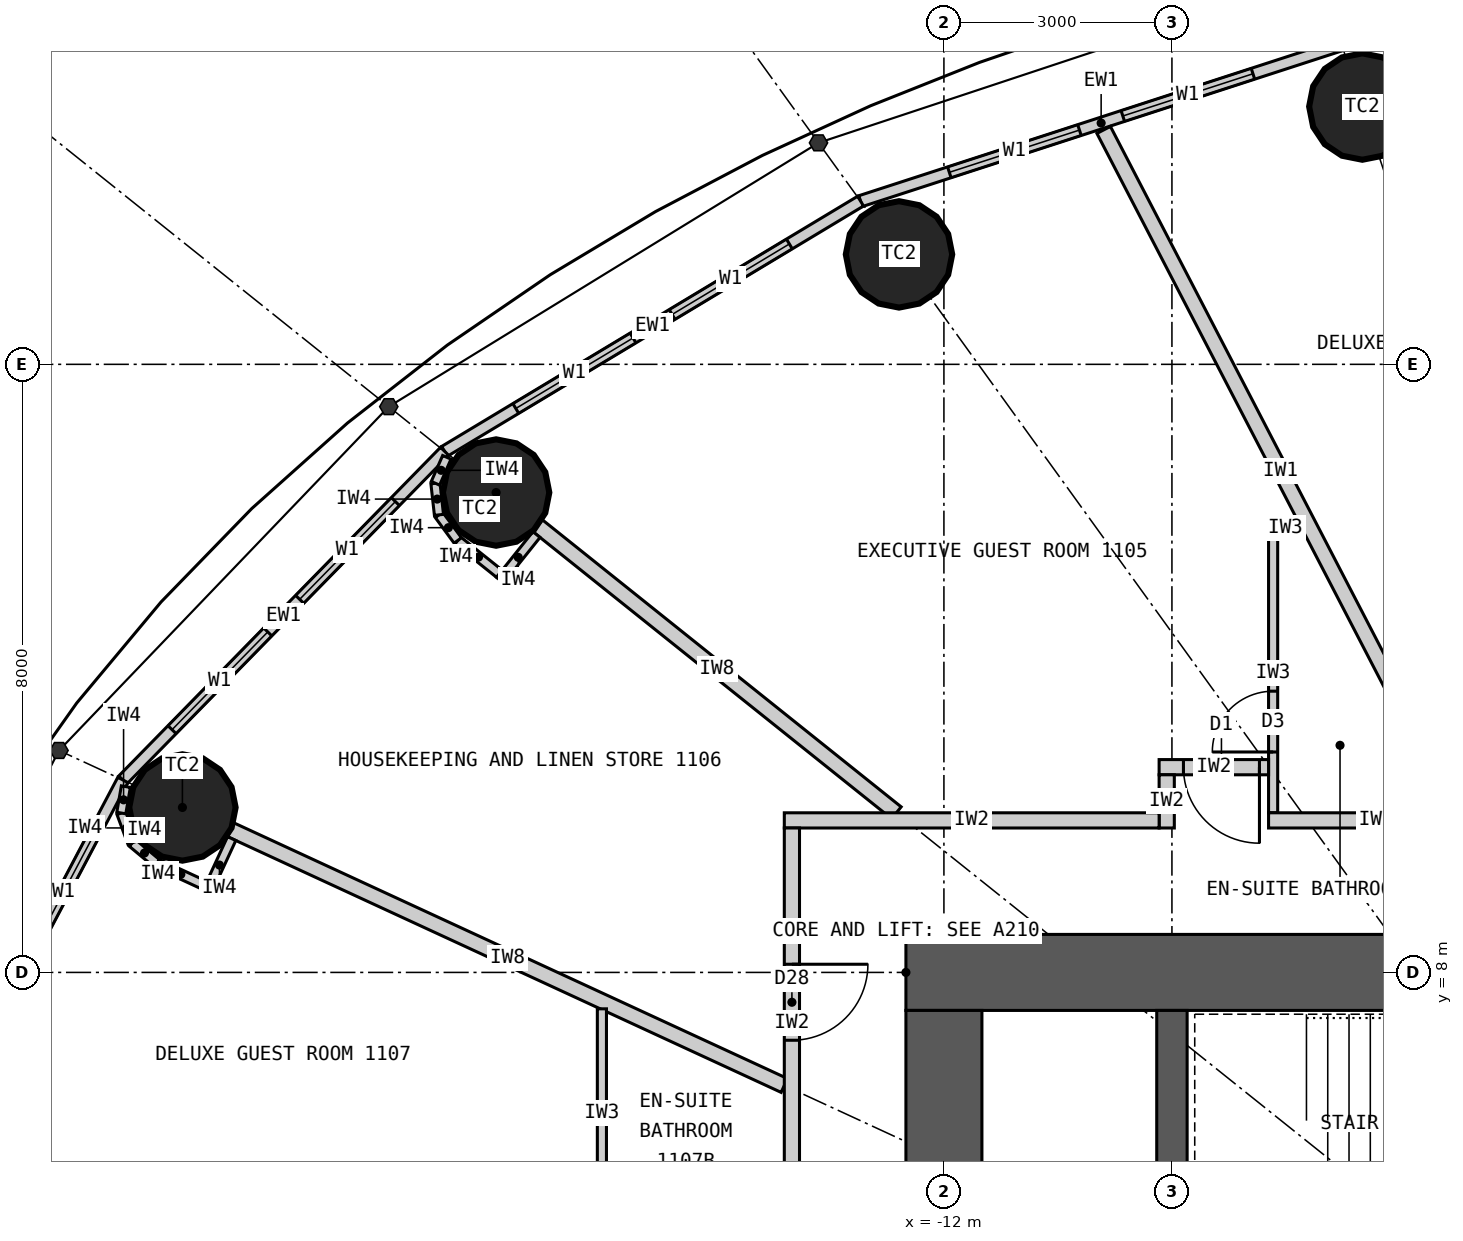
"""IFC4 building model, lengths in metres.
Left out: names, types, materials, properties, quantities, classifications, styles, units other than length and angle.
Written with IfcOpenShell. Run it as: python <this file> out.ifc"""

import sys

from ifc_helpers import new_model, si_unit, direction, frame, frame_2d, origin, origin_2d, place, context, subcontext, project, spatial, rectangle, circle, extrude, element, fill, save


model = new_model("IFC4")
c1 = context("Model", 3, precision=1e-05, world=origin(), true_north=direction((0.0, 1.0)))
c2 = subcontext(c1, "Body", "Model", "MODEL_VIEW")
j1 = project(units=[si_unit("LENGTHUNIT", "METRE"), si_unit("PLANEANGLEUNIT", "RADIAN")], contexts=[c1])
p1 = place(None, origin())
s1 = spatial("IfcSite", under=j1, at=p1, CompositionType="ELEMENT")
p2 = place(p1, origin())
s2 = spatial("IfcBuilding", under=s1, at=p2, CompositionType="ELEMENT")
p3 = place(p2, frame((0.0, 0.0, 50.7)))
s3 = spatial("IfcBuildingStorey", under=s2, at=p3, CompositionType="ELEMENT", Elevation=50.7)
for number, where, z_axis, x_axis in (
    (1, (-6.495, 19.391, 0.0), (0.0, 0.0, 1.0), (1.0, 0.0, 0.0)),
    (2, (-12.591, 17.447, 0.0), (0.0, 0.0, 1.0), (1.0, 0.0, 0.0)),
    (3, (-17.892, 14.313, 0.0), (0.0, 0.0, 1.0), (1.0, 0.0, 0.0)),
    (4, (-22.019, 10.17, 0.0), (0.0, 0.0, 1.0), (1.0, 0.0, 0.0)),
):
    element("IfcColumn", number, at=place(p3, frame(where, z_axis=z_axis, x_axis=x_axis)), inside=s3, PredefinedType="COLUMN", context=c2, shape_type="SweptSolid", body=[
        extrude(circle(Radius=0.7, at=origin_2d()), origin(), (0.0, 0.0, 1.0), 3.3),
    ])
p4 = place(p3, frame((-12.5, 8.0, 0.0), z_axis=(0.0, 0.0, 1.0), x_axis=(1.0, 0.0, 0.0)))
e5 = element("IfcWall", 5, at=p4, inside=s3, PredefinedType="SHEAR", context=c2, shape_type="SweptSolid", body=[
    extrude(rectangle(XDim=25.0, YDim=1.0, at=frame_2d((12.5, 0.0))), origin(), (0.0, 0.0, 1.0), 3.3),
])
p5 = place(p4, frame((11.2, 0.0, 0.0)))
e6 = element("IfcOpeningElement", 6, at=p5, cuts=e5, PredefinedType="OPENING", context=c2, shape_type="SweptSolid", body=[
    extrude(rectangle(XDim=1.2, YDim=2.2, at=frame_2d((0.6, 1.1))), frame((0.0, 0.51, 0.0), z_axis=(0.0, -1.0, 0.0), x_axis=(1.0, 0.0, 0.0)), (0.0, 0.0, 1.0), 1.02),
])
p6 = place(p4, frame((18.8, 0.0, 0.0)))
e7 = element("IfcOpeningElement", 7, at=p6, cuts=e5, PredefinedType="OPENING", context=c2, shape_type="SweptSolid", body=[
    extrude(rectangle(XDim=0.9, YDim=2.2, at=frame_2d((0.45, 1.1))), frame((0.0, 0.51, 0.0), z_axis=(0.0, -1.0, 0.0), x_axis=(1.0, 0.0, 0.0)), (0.0, 0.0, 1.0), 1.02),
])
p7 = place(p3, frame((-12.0, 7.5, 0.0), z_axis=(0.0, 0.0, 1.0), x_axis=(0.0, -1.0, 0.0)))
e8 = element("IfcWall", 8, at=p7, inside=s3, PredefinedType="SHEAR", context=c2, shape_type="SweptSolid", body=[
    extrude(rectangle(XDim=15.0, YDim=1.0, at=frame_2d((7.5, 0.0))), origin(), (0.0, 0.0, 1.0), 3.3),
])
p8 = place(p7, frame((6.6, 0.0, 0.0)))
e9 = element("IfcOpeningElement", 9, at=p8, cuts=e8, PredefinedType="OPENING", context=c2, shape_type="SweptSolid", body=[
    extrude(rectangle(XDim=1.8, YDim=2.2, at=frame_2d((0.9, 1.1))), frame((0.0, 0.51, 0.0), z_axis=(0.0, -1.0, 0.0), x_axis=(1.0, 0.0, 0.0)), (0.0, 0.0, 1.0), 1.02),
])
p9 = place(p3, frame((-9.0, 4.5, 0.0), z_axis=(0.0, 0.0, 1.0), x_axis=(0.0, 1.0, 0.0)))
e10 = element("IfcWall", 10, at=p9, inside=s3, PredefinedType="SHEAR", context=c2, shape_type="SweptSolid", body=[
    extrude(rectangle(XDim=3.0, YDim=0.4, at=frame_2d((1.5, 0.0))), origin(), (0.0, 0.0, 1.0), 3.3),
])
p10 = place(p3, frame((-6.766, 20.202, 0.0), z_axis=(0.0, 0.0, 1.0), x_axis=(-0.951137534625, -0.308767534285, 0.0)))
e11 = element("IfcWall", 11, at=p10, inside=s3, PredefinedType="ELEMENTEDWALL", context=c2, shape_type="SweptSolid", body=[
    extrude(rectangle(XDim=6.655, YDim=0.15, at=frame_2d((3.328, 0.0))), origin(), (0.0, 0.0, 1.0), 3.12),
])
p11 = place(p10, frame((1.228, 0.0, 0.9)))
e12 = element("IfcOpeningElement", 12, at=p11, cuts=e11, PredefinedType="OPENING", context=c2, shape_type="SweptSolid", body=[
    extrude(rectangle(XDim=1.8, YDim=1.9, at=frame_2d((0.9, 0.95))), frame((0.0, 0.085, 0.0), z_axis=(0.0, -1.0, 0.0), x_axis=(1.0, 0.0, 0.0)), (0.0, 0.0, 1.0), 0.17),
])
p12 = place(p10, frame((3.628, 0.0, 0.9)))
e13 = element("IfcOpeningElement", 13, at=p12, cuts=e11, PredefinedType="OPENING", context=c2, shape_type="SweptSolid", body=[
    extrude(rectangle(XDim=1.8, YDim=1.9, at=frame_2d((0.9, 0.95))), frame((0.0, 0.085, 0.0), z_axis=(0.0, -1.0, 0.0), x_axis=(1.0, 0.0, 0.0)), (0.0, 0.0, 1.0), 0.17),
])
p13 = place(p3, frame((-13.096, 18.147, 0.0), z_axis=(0.0, 0.0, 1.0), x_axis=(-0.856983180864, -0.515344377787, 0.0)))
e14 = element("IfcWall", 14, at=p13, inside=s3, PredefinedType="ELEMENTEDWALL", context=c2, shape_type="SweptSolid", body=[
    extrude(rectangle(XDim=6.386, YDim=0.15, at=frame_2d((3.193, 0.0))), origin(), (0.0, 0.0, 1.0), 3.12),
])
p14 = place(p13, frame((1.093, 0.0, 0.9)))
e15 = element("IfcOpeningElement", 15, at=p14, cuts=e14, PredefinedType="OPENING", context=c2, shape_type="SweptSolid", body=[
    extrude(rectangle(XDim=1.8, YDim=1.9, at=frame_2d((0.9, 0.95))), frame((0.0, 0.085, 0.0), z_axis=(0.0, -1.0, 0.0), x_axis=(1.0, 0.0, 0.0)), (0.0, 0.0, 1.0), 0.17),
])
p15 = place(p13, frame((3.493, 0.0, 0.9)))
e16 = element("IfcOpeningElement", 16, at=p15, cuts=e14, PredefinedType="OPENING", context=c2, shape_type="SweptSolid", body=[
    extrude(rectangle(XDim=1.8, YDim=1.9, at=frame_2d((0.9, 0.95))), frame((0.0, 0.085, 0.0), z_axis=(0.0, -1.0, 0.0), x_axis=(1.0, 0.0, 0.0)), (0.0, 0.0, 1.0), 0.17),
])
p16 = place(p3, frame((-18.57, 14.856, 0.0), z_axis=(0.0, 0.0, 1.0), x_axis=(-0.699602905915, -0.714531856557, 0.0)))
e17 = element("IfcWall", 17, at=p16, inside=s3, PredefinedType="ELEMENTEDWALL", context=c2, shape_type="SweptSolid", body=[
    extrude(rectangle(XDim=6.051, YDim=0.15, at=frame_2d((3.025, 0.0))), origin(), (0.0, 0.0, 1.0), 3.12),
])
p17 = place(p16, frame((0.926, 0.0, 0.9)))
e18 = element("IfcOpeningElement", 18, at=p17, cuts=e17, PredefinedType="OPENING", context=c2, shape_type="SweptSolid", body=[
    extrude(rectangle(XDim=1.8, YDim=1.9, at=frame_2d((0.9, 0.95))), frame((0.0, 0.085, 0.0), z_axis=(0.0, -1.0, 0.0), x_axis=(1.0, 0.0, 0.0)), (0.0, 0.0, 1.0), 0.17),
])
p18 = place(p16, frame((3.325, 0.0, 0.9)))
e19 = element("IfcOpeningElement", 19, at=p18, cuts=e17, PredefinedType="OPENING", context=c2, shape_type="SweptSolid", body=[
    extrude(rectangle(XDim=1.8, YDim=1.9, at=frame_2d((0.9, 0.95))), frame((0.0, 0.085, 0.0), z_axis=(0.0, -1.0, 0.0), x_axis=(1.0, 0.0, 0.0)), (0.0, 0.0, 1.0), 0.17),
])
p19 = place(p3, frame((-22.803, 10.532, 0.0), z_axis=(0.0, 0.0, 1.0), x_axis=(-0.467296867008, -0.884100468321, 0.0)))
e20 = element("IfcWall", 20, at=p19, inside=s3, PredefinedType="ELEMENTEDWALL", context=c2, shape_type="SweptSolid", body=[
    extrude(rectangle(XDim=5.734, YDim=0.15, at=frame_2d((2.867, 0.0))), origin(), (0.0, 0.0, 1.0), 3.12),
])
p20 = place(p19, frame((0.767, 0.0, 0.9)))
e21 = element("IfcOpeningElement", 21, at=p20, cuts=e20, PredefinedType="OPENING", context=c2, shape_type="SweptSolid", body=[
    extrude(rectangle(XDim=1.8, YDim=1.9, at=frame_2d((0.9, 0.95))), frame((0.0, 0.085, 0.0), z_axis=(0.0, -1.0, 0.0), x_axis=(1.0, 0.0, 0.0)), (0.0, 0.0, 1.0), 0.17),
])
p21 = place(p19, frame((3.167, 0.0, 0.9)))
e22 = element("IfcOpeningElement", 22, at=p21, cuts=e20, PredefinedType="OPENING", context=c2, shape_type="SweptSolid", body=[
    extrude(rectangle(XDim=1.8, YDim=1.9, at=frame_2d((0.9, 0.95))), frame((0.0, 0.085, 0.0), z_axis=(0.0, -1.0, 0.0), x_axis=(1.0, 0.0, 0.0)), (0.0, 0.0, 1.0), 0.17),
])
p22 = place(p3, frame((-5.239, 10.1, 0.0), z_axis=(0.0, 0.0, 1.0), x_axis=(-0.460422783389, 0.887699758103, 0.0)))
e23 = element("IfcWall", 23, at=p22, inside=s3, PredefinedType="PARTITIONING", context=c2, shape_type="SweptSolid", body=[
    extrude(rectangle(XDim=10.12, YDim=0.2, at=frame_2d((5.06, 0.0))), origin(), (0.0, 0.0, 1.0), 3.12),
])
p23 = place(p3, frame((-12.625, 10.1, 0.0), z_axis=(0.0, 0.0, 1.0), x_axis=(-0.780892451574, 0.624665493744, 0.0)))
e24 = element("IfcWall", 24, at=p23, inside=s3, PredefinedType="PARTITIONING", context=c2, shape_type="SweptSolid", body=[
    extrude(rectangle(XDim=6.045, YDim=0.2, at=frame_2d((3.022, 0.0))), origin(), (0.0, 0.0, 1.0), 2.32),
])
p24 = place(p3, frame((-14.1, 6.512, 0.0), z_axis=(0.0, 0.0, 1.0), x_axis=(-0.907832871056, 0.419332181247, 0.0)))
e25 = element("IfcWall", 25, at=p24, inside=s3, PredefinedType="PARTITIONING", context=c2, shape_type="SweptSolid", body=[
    extrude(rectangle(XDim=8.023, YDim=0.2, at=frame_2d((4.011, 0.0))), origin(), (0.0, 0.0, 1.0), 2.32),
])
p25 = place(p3, frame((-7.284, 13.85, 0.0), z_axis=(0.0, 0.0, 1.0), x_axis=(-1.0, 0.0, 0.0)))
e26 = element("IfcWall", 26, at=p25, inside=s3, PredefinedType="PARTITIONING", context=c2, shape_type="SweptSolid", body=[
    extrude(rectangle(XDim=0.445, YDim=0.12, at=frame_2d((0.222, 0.0))), origin(), (0.0, 0.0, 1.0), 3.12),
])
p26 = place(p3, frame((-7.669, 10.1, 0.0), z_axis=(0.0, 0.0, 1.0), x_axis=(0.0, 1.0, 0.0)))
e27 = element("IfcWall", 27, at=p26, inside=s3, PredefinedType="PARTITIONING", context=c2, shape_type="SweptSolid", body=[
    extrude(rectangle(XDim=3.69, YDim=0.12, at=frame_2d((1.845, 0.0))), origin(), (0.0, 0.0, 1.0), 3.12),
])
p27 = place(p26, frame((0.8, 0.0, 0.0)))
e28 = element("IfcOpeningElement", 28, at=p27, cuts=e27, PredefinedType="OPENING", context=c2, shape_type="SweptSolid", body=[
    extrude(rectangle(XDim=0.8, YDim=2.1, at=frame_2d((0.4, 1.05))), frame((0.0, 0.07, 0.0), z_axis=(0.0, -1.0, 0.0), x_axis=(1.0, 0.0, 0.0)), (0.0, 0.0, 1.0), 0.14),
])
p28 = place(p3, frame((-16.5, 7.521, 0.0), z_axis=(0.0, 0.0, 1.0), x_axis=(0.0, -1.0, 0.0)))
e29 = element("IfcWall", 29, at=p28, inside=s3, PredefinedType="PARTITIONING", context=c2, shape_type="SweptSolid", body=[
    extrude(rectangle(XDim=2.749, YDim=0.12, at=frame_2d((1.374, 0.0))), origin(), (0.0, 0.0, 1.0), 3.12),
])
p29 = place(p3, frame((-9.169, 10.7, 0.0), z_axis=(0.0, 0.0, 1.0), x_axis=(1.0, 0.0, 0.0)))
e30 = element("IfcWall", 30, at=p29, inside=s3, PredefinedType="PARTITIONING", context=c2, shape_type="SweptSolid", body=[
    extrude(rectangle(XDim=1.44, YDim=0.2, at=frame_2d((0.72, 0.0))), origin(), (0.0, 0.0, 1.0), 3.12),
])
p30 = place(p29, frame((0.32, 0.0, 0.0)))
e31 = element("IfcOpeningElement", 31, at=p30, cuts=e30, PredefinedType="OPENING", context=c2, shape_type="SweptSolid", body=[
    extrude(rectangle(XDim=1.0, YDim=2.2, at=frame_2d((0.5, 1.1))), frame((0.0, 0.11, 0.0), z_axis=(0.0, -1.0, 0.0), x_axis=(1.0, 0.0, 0.0)), (0.0, 0.0, 1.0), 0.22),
])
p31 = place(p3, frame((-9.069, 9.9, 0.0), z_axis=(0.0, 0.0, 1.0), x_axis=(0.0, 1.0, 0.0)))
e32 = element("IfcWall", 32, at=p31, inside=s3, PredefinedType="PARTITIONING", context=c2, shape_type="SweptSolid", body=[
    extrude(rectangle(XDim=0.7, YDim=0.2, at=frame_2d((0.35, 0.0))), origin(), (0.0, 0.0, 1.0), 3.12),
])
p32 = place(p3, frame((-14.1, 10.0, 0.0), z_axis=(0.0, 0.0, 1.0), x_axis=(1.0, 0.0, 0.0)))
e33 = element("IfcWall", 33, at=p32, inside=s3, PredefinedType="PARTITIONING", context=c2, shape_type="SweptSolid", body=[
    extrude(rectangle(XDim=4.931, YDim=0.2, at=frame_2d((2.466, 0.0))), origin(), (0.0, 0.0, 1.0), 3.12),
])
p33 = place(p3, frame((-7.729, 10.0, 0.0), z_axis=(0.0, 0.0, 1.0), x_axis=(1.0, 0.0, 0.0)))
e34 = element("IfcWall", 34, at=p33, inside=s3, PredefinedType="PARTITIONING", context=c2, shape_type="SweptSolid", body=[
    extrude(rectangle(XDim=2.833, YDim=0.2, at=frame_2d((1.417, 0.0))), origin(), (0.0, 0.0, 1.0), 3.12),
])
p34 = place(p3, frame((-14.0, 9.9, 0.0), z_axis=(0.0, 0.0, 1.0), x_axis=(0.0, -1.0, 0.0)))
e35 = element("IfcWall", 35, at=p34, inside=s3, PredefinedType="PARTITIONING", context=c2, shape_type="SweptSolid", body=[
    extrude(rectangle(XDim=5.127, YDim=0.2, at=frame_2d((2.564, 0.0))), origin(), (0.0, 0.0, 1.0), 3.12),
])
p35 = place(p34, frame((1.792, 0.0, 0.0)))
e36 = element("IfcOpeningElement", 36, at=p35, cuts=e35, PredefinedType="OPENING", context=c2, shape_type="SweptSolid", body=[
    extrude(rectangle(XDim=1.0, YDim=2.2, at=frame_2d((0.5, 1.1))), frame((0.0, 0.11, 0.0), z_axis=(0.0, -1.0, 0.0), x_axis=(1.0, 0.0, 0.0)), (0.0, 0.0, 1.0), 0.22),
])
p36 = place(p3, frame((-17.361, 13.76, 0.0), z_axis=(0.0, 0.0, 1.0), x_axis=(-0.624501042889, -0.781023973659, 0.0)))
e37 = element("IfcWall", 37, at=p36, inside=s3, PredefinedType="PARTITIONING", context=c2, shape_type="SweptSolid", body=[
    extrude(rectangle(XDim=0.767, YDim=0.12, at=frame_2d((0.384, 0.0))), origin(), (0.0, 0.0, 1.0), 3.12),
])
p37 = place(p3, frame((-17.85, 13.246, 0.0), z_axis=(0.0, 0.0, 1.0), x_axis=(-0.780902834923, 0.62465251333, 0.0)))
e38 = element("IfcWall", 38, at=p37, inside=s3, PredefinedType="PARTITIONING", context=c2, shape_type="SweptSolid", body=[
    extrude(rectangle(XDim=0.7, YDim=0.12, at=frame_2d((0.35, 0.0))), origin(), (0.0, 0.0, 1.0), 3.12),
])
for number, where, z_axis, x_axis in (
    (39, (-18.396, 13.683, 0.0), (0.0, 0.0, 1.0), (-0.592, 0.806, 0.0)),
    (40, (-18.644, 14.02, 0.0), (0.0, 0.0, 1.0), (-0.11, 0.994, 0.0)),
):
    element("IfcWall", number, at=place(p3, frame(where, z_axis=z_axis, x_axis=x_axis)), inside=s3, PredefinedType="PARTITIONING", context=c2, shape_type="SweptSolid", body=[
        extrude(rectangle(XDim=0.418, YDim=0.12, at=frame_2d((0.209, 0.0))), origin(), (0.0, 0.0, 1.0), 3.12),
    ])
p38 = place(p3, frame((-18.69, 14.435, 0.0), z_axis=(0.0, 0.0, 1.0), x_axis=(0.401093412634, 0.91603715773, 0.0)))
e41 = element("IfcWall", 41, at=p38, inside=s3, PredefinedType="PARTITIONING", context=c2, shape_type="SweptSolid", body=[
    extrude(rectangle(XDim=0.373, YDim=0.12, at=frame_2d((0.187, 0.0))), origin(), (0.0, 0.0, 1.0), 3.12),
])
p39 = place(p3, frame((-21.371, 9.761, 0.0), z_axis=(0.0, 0.0, 1.0), x_axis=(-0.419259891039, -0.907866258744, 0.0)))
e42 = element("IfcWall", 42, at=p39, inside=s3, PredefinedType="PARTITIONING", context=c2, shape_type="SweptSolid", body=[
    extrude(rectangle(XDim=0.768, YDim=0.12, at=frame_2d((0.384, 0.0))), origin(), (0.0, 0.0, 1.0), 3.12),
])
p40 = place(p3, frame((-21.722, 9.144, 0.0), z_axis=(0.0, 0.0, 1.0), x_axis=(-0.907877701396, 0.419235112208, 0.0)))
e43 = element("IfcWall", 43, at=p40, inside=s3, PredefinedType="PARTITIONING", context=c2, shape_type="SweptSolid", body=[
    extrude(rectangle(XDim=0.7, YDim=0.12, at=frame_2d((0.35, 0.0))), origin(), (0.0, 0.0, 1.0), 3.12),
])
p41 = place(p3, frame((-22.358, 9.437, 0.0), z_axis=(0.0, 0.0, 1.0), x_axis=(-0.768412687942, 0.639954639806, 0.0)))
e44 = element("IfcWall", 44, at=p41, inside=s3, PredefinedType="PARTITIONING", context=c2, shape_type="SweptSolid", body=[
    extrude(rectangle(XDim=0.418, YDim=0.12, at=frame_2d((0.209, 0.0))), origin(), (0.0, 0.0, 1.0), 3.12),
])
p42 = place(p3, frame((-22.679, 9.705, 0.0), z_axis=(0.0, 0.0, 1.0), x_axis=(-0.345164001646, 0.938542386879, 0.0)))
e45 = element("IfcWall", 45, at=p42, inside=s3, PredefinedType="PARTITIONING", context=c2, shape_type="SweptSolid", body=[
    extrude(rectangle(XDim=0.418, YDim=0.12, at=frame_2d((0.209, 0.0))), origin(), (0.0, 0.0, 1.0), 3.12),
])
p43 = place(p3, frame((-22.823, 10.097, 0.0), z_axis=(0.0, 0.0, 1.0), x_axis=(0.169674995186, 0.985500074079, 0.0)))
e46 = element("IfcWall", 46, at=p43, inside=s3, PredefinedType="PARTITIONING", context=c2, shape_type="SweptSolid", body=[
    extrude(rectangle(XDim=0.353, YDim=0.12, at=frame_2d((0.176, 0.0))), origin(), (0.0, 0.0, 1.0), 3.12),
])
p44 = place(p11, origin())
e47 = element("IfcWindow", 47, at=p44, inside=s3, PartitioningType="SINGLE_PANEL", PredefinedType="WINDOW", context=c2, shape_type="SweptSolid", body=[
    extrude(rectangle(XDim=1.8, YDim=1.9, at=frame_2d((0.9, 0.95))), frame((0.0, 0.03, 0.0), z_axis=(0.0, -1.0, 0.0), x_axis=(1.0, 0.0, 0.0)), (0.0, 0.0, 1.0), 0.06),
])
fill(e12, e47)
p45 = place(p12, origin())
e48 = element("IfcWindow", 48, at=p45, inside=s3, PartitioningType="SINGLE_PANEL", PredefinedType="WINDOW", context=c2, shape_type="SweptSolid", body=[
    extrude(rectangle(XDim=1.8, YDim=1.9, at=frame_2d((0.9, 0.95))), frame((0.0, 0.03, 0.0), z_axis=(0.0, -1.0, 0.0), x_axis=(1.0, 0.0, 0.0)), (0.0, 0.0, 1.0), 0.06),
])
fill(e13, e48)
p46 = place(p14, origin())
e49 = element("IfcWindow", 49, at=p46, inside=s3, PartitioningType="SINGLE_PANEL", PredefinedType="WINDOW", context=c2, shape_type="SweptSolid", body=[
    extrude(rectangle(XDim=1.8, YDim=1.9, at=frame_2d((0.9, 0.95))), frame((0.0, 0.03, 0.0), z_axis=(0.0, -1.0, 0.0), x_axis=(1.0, 0.0, 0.0)), (0.0, 0.0, 1.0), 0.06),
])
fill(e15, e49)
p47 = place(p15, origin())
e50 = element("IfcWindow", 50, at=p47, inside=s3, PartitioningType="SINGLE_PANEL", PredefinedType="WINDOW", context=c2, shape_type="SweptSolid", body=[
    extrude(rectangle(XDim=1.8, YDim=1.9, at=frame_2d((0.9, 0.95))), frame((0.0, 0.03, 0.0), z_axis=(0.0, -1.0, 0.0), x_axis=(1.0, 0.0, 0.0)), (0.0, 0.0, 1.0), 0.06),
])
fill(e16, e50)
p48 = place(p17, origin())
e51 = element("IfcWindow", 51, at=p48, inside=s3, PartitioningType="SINGLE_PANEL", PredefinedType="WINDOW", context=c2, shape_type="SweptSolid", body=[
    extrude(rectangle(XDim=1.8, YDim=1.9, at=frame_2d((0.9, 0.95))), frame((0.0, 0.03, 0.0), z_axis=(0.0, -1.0, 0.0), x_axis=(1.0, 0.0, 0.0)), (0.0, 0.0, 1.0), 0.06),
])
fill(e18, e51)
p49 = place(p18, origin())
e52 = element("IfcWindow", 52, at=p49, inside=s3, PartitioningType="SINGLE_PANEL", PredefinedType="WINDOW", context=c2, shape_type="SweptSolid", body=[
    extrude(rectangle(XDim=1.8, YDim=1.9, at=frame_2d((0.9, 0.95))), frame((0.0, 0.03, 0.0), z_axis=(0.0, -1.0, 0.0), x_axis=(1.0, 0.0, 0.0)), (0.0, 0.0, 1.0), 0.06),
])
fill(e19, e52)
p50 = place(p20, origin())
e53 = element("IfcWindow", 53, at=p50, inside=s3, PartitioningType="SINGLE_PANEL", PredefinedType="WINDOW", context=c2, shape_type="SweptSolid", body=[
    extrude(rectangle(XDim=1.8, YDim=1.9, at=frame_2d((0.9, 0.95))), frame((0.0, 0.03, 0.0), z_axis=(0.0, -1.0, 0.0), x_axis=(1.0, 0.0, 0.0)), (0.0, 0.0, 1.0), 0.06),
])
fill(e21, e53)
p51 = place(p27, origin())
e54 = element("IfcDoor", 54, at=p51, inside=s3, OperationType="SINGLE_SWING_LEFT", PredefinedType="DOOR", context=c2, shape_type="SweptSolid", body=[
    extrude(rectangle(XDim=0.8, YDim=2.1, at=frame_2d((0.4, 1.05))), frame((0.0, 0.025, 0.0), z_axis=(0.0, -1.0, 0.0), x_axis=(1.0, 0.0, 0.0)), (0.0, 0.0, 1.0), 0.05),
])
fill(e28, e54)
p52 = place(p30, origin())
e55 = element("IfcDoor", 55, at=p52, inside=s3, OperationType="SINGLE_SWING_RIGHT", PredefinedType="DOOR", context=c2, shape_type="SweptSolid", body=[
    extrude(rectangle(XDim=1.0, YDim=2.2, at=frame_2d((0.5, 1.1))), frame((0.0, 0.025, 0.0), z_axis=(0.0, -1.0, 0.0), x_axis=(1.0, 0.0, 0.0)), (0.0, 0.0, 1.0), 0.05),
])
fill(e31, e55)
p53 = place(p35, origin())
e56 = element("IfcDoor", 56, at=p53, inside=s3, OperationType="SINGLE_SWING_LEFT", PredefinedType="DOOR", context=c2, shape_type="SweptSolid", body=[
    extrude(rectangle(XDim=1.0, YDim=2.2, at=frame_2d((0.5, 1.1))), frame((0.0, 0.025, 0.0), z_axis=(0.0, -1.0, 0.0), x_axis=(1.0, 0.0, 0.0)), (0.0, 0.0, 1.0), 0.05),
])
fill(e36, e56)
save(model, sys.argv[1])
